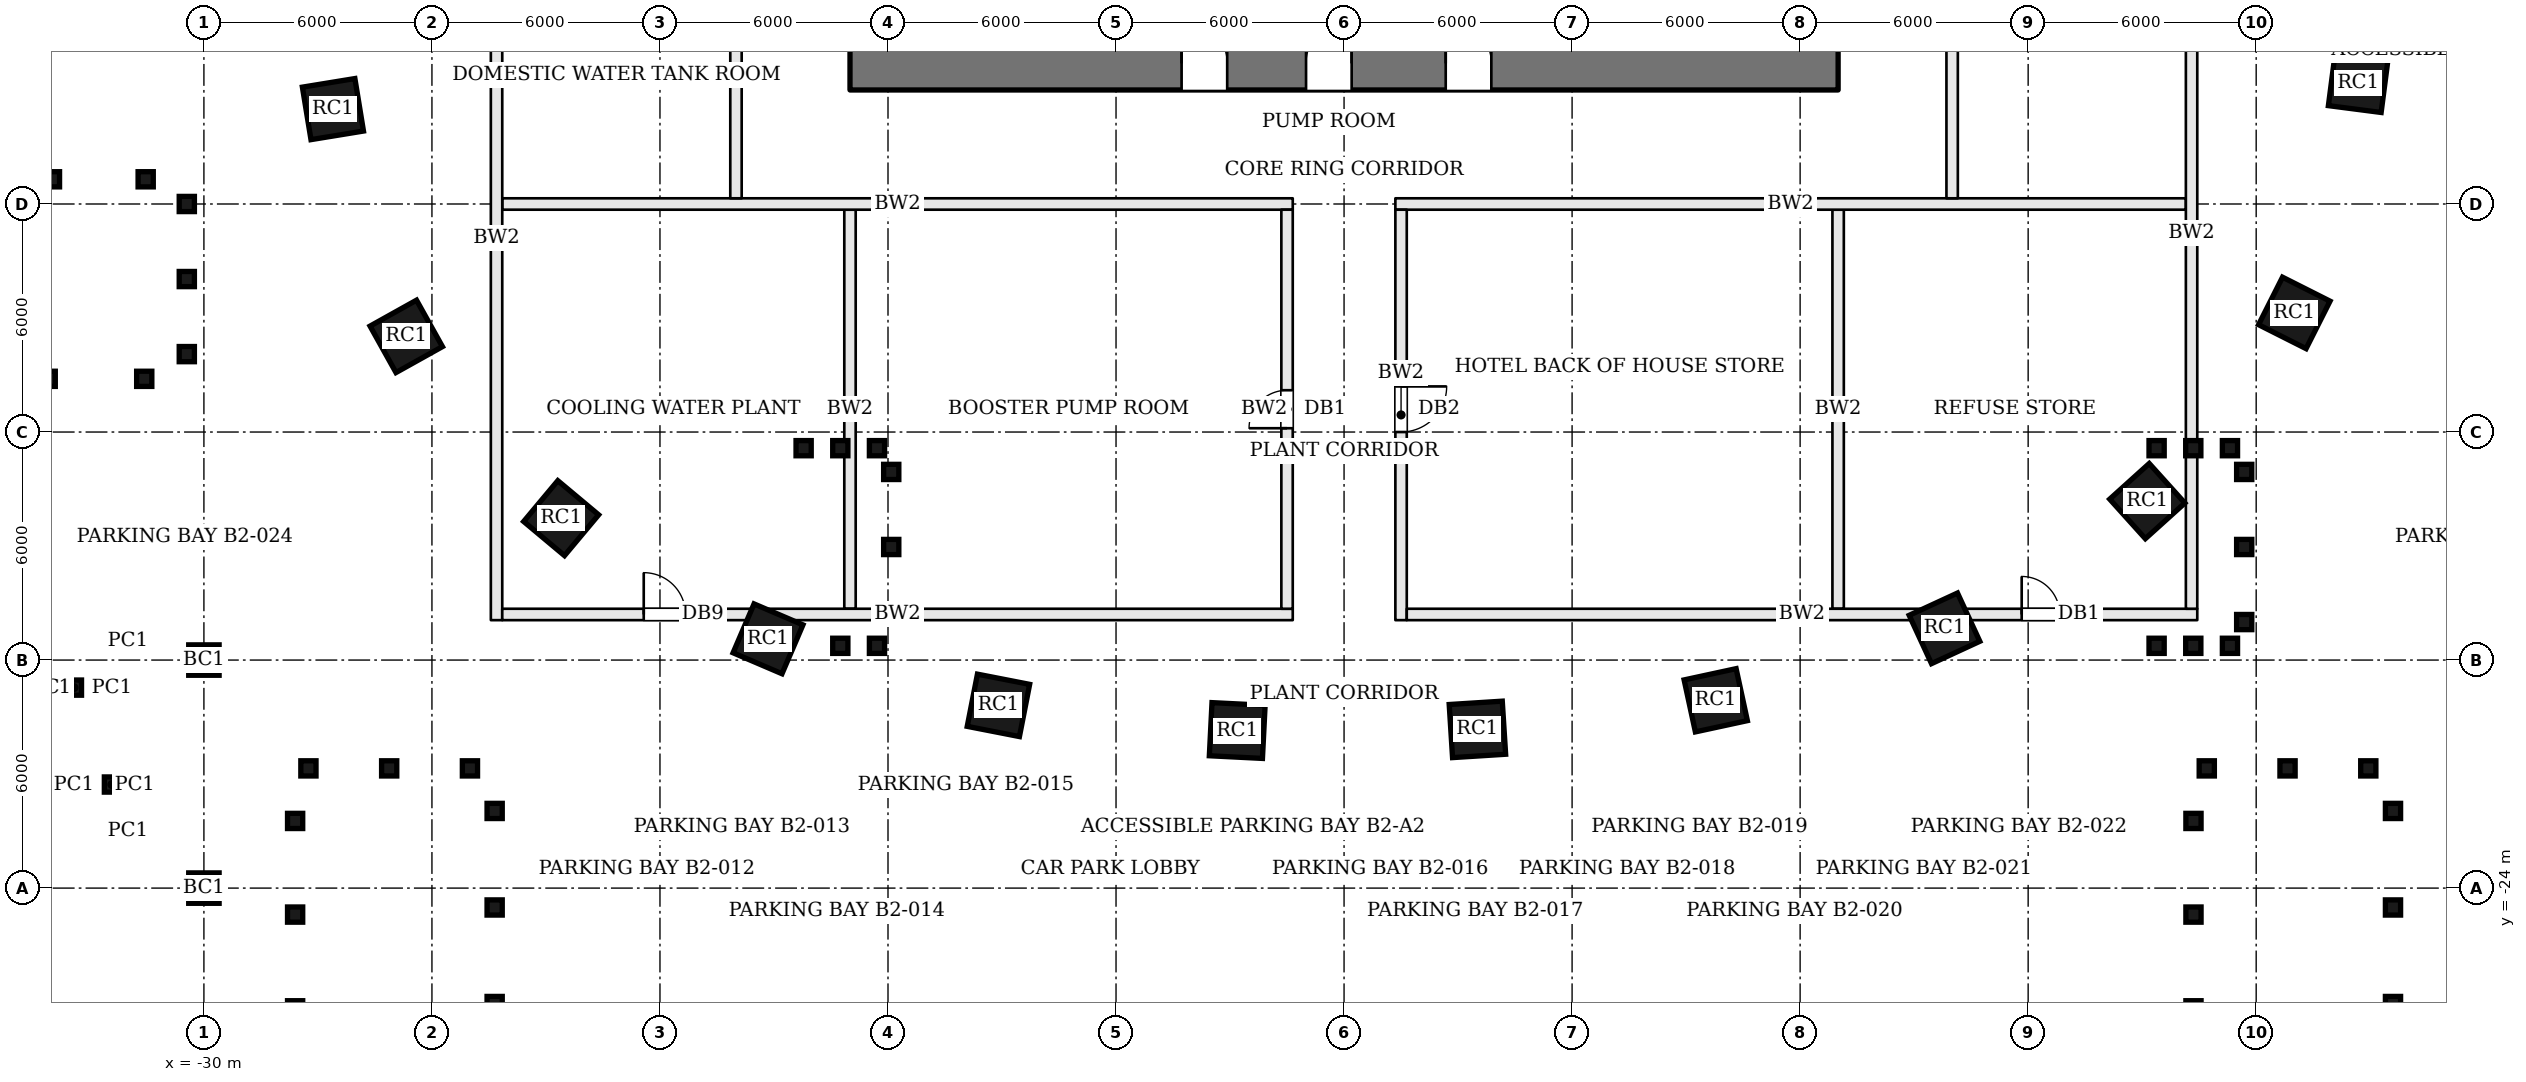
"""IFC4 building model, lengths in metres.
Left out: names, types, materials, properties, quantities, classifications, styles, units other than length and angle.
Written with IfcOpenShell. Run it as: python <this file> out.ifc"""

import sys

from ifc_helpers import new_model, si_unit, direction, frame, frame_2d, origin, origin_2d, place, context, subcontext, project, spatial, rectangle, extrude, element, fill, save


model = new_model("IFC4")
c1 = context("Model", 3, precision=1e-05, world=origin(), true_north=direction((0.0, 1.0)))
c2 = subcontext(c1, "Body", "Model", "MODEL_VIEW")
j1 = project(units=[si_unit("LENGTHUNIT", "METRE"), si_unit("PLANEANGLEUNIT", "RADIAN")], contexts=[c1])
p1 = place(None, origin())
s1 = spatial("IfcSite", under=j1, at=p1, CompositionType="ELEMENT")
p2 = place(p1, origin())
s2 = spatial("IfcBuilding", under=s1, at=p2, CompositionType="ELEMENT")
p3 = place(p2, frame((0.0, 0.0, -10.5)))
s3 = spatial("IfcBuildingStorey", under=s2, at=p3, CompositionType="ELEMENT", Elevation=-10.5)
for number, where, z_axis, x_axis in (
    (1, (-30.0, -24.0, 0.0), (0.0, 0.0, 1.0), (1.0, 0.0, 0.0)),
    (2, (-30.0, -18.0, 0.0), (0.0, 0.0, 1.0), (1.0, 0.0, 0.0)),
):
    element("IfcColumn", number, at=place(p3, frame(where, z_axis=z_axis, x_axis=x_axis)), inside=s3, PredefinedType="COLUMN", context=c2, shape_type="SweptSolid", body=[
        extrude(rectangle(XDim=0.8, YDim=0.8, at=origin_2d()), origin(), (0.0, 0.0, 1.0), 4.5),
    ])
p4 = place(p3, frame((-13.0, -2.3, 0.0), z_axis=(0.0, 0.0, 1.0), x_axis=(1.0, 0.0, 0.0)))
e3 = element("IfcWall", 3, at=p4, inside=s3, PredefinedType="SHEAR", context=c2, shape_type="SweptSolid", body=[
    extrude(rectangle(XDim=26.0, YDim=1.4, at=frame_2d((13.0, 0.0))), origin(), (0.0, 0.0, 1.0), 4.5),
])
p5 = place(p4, frame((8.725, 0.0, 0.0)))
e4 = element("IfcOpeningElement", 4, at=p5, cuts=e3, PredefinedType="OPENING", context=c2, shape_type="SweptSolid", body=[
    extrude(rectangle(XDim=1.2, YDim=2.1, at=frame_2d((0.6, 1.05))), frame((0.0, 0.71, 0.0), z_axis=(0.0, -1.0, 0.0), x_axis=(1.0, 0.0, 0.0)), (0.0, 0.0, 1.0), 1.42),
])
p6 = place(p4, frame((12.0, 0.0, 0.0)))
e5 = element("IfcOpeningElement", 5, at=p6, cuts=e3, PredefinedType="OPENING", context=c2, shape_type="SweptSolid", body=[
    extrude(rectangle(XDim=1.2, YDim=2.1, at=frame_2d((0.6, 1.05))), frame((0.0, 0.71, 0.0), z_axis=(0.0, -1.0, 0.0), x_axis=(1.0, 0.0, 0.0)), (0.0, 0.0, 1.0), 1.42),
])
p7 = place(p4, frame((15.675, 0.0, 0.0)))
e6 = element("IfcOpeningElement", 6, at=p7, cuts=e3, PredefinedType="OPENING", context=c2, shape_type="SweptSolid", body=[
    extrude(rectangle(XDim=1.2, YDim=2.1, at=frame_2d((0.6, 1.05))), frame((0.0, 0.71, 0.0), z_axis=(0.0, -1.0, 0.0), x_axis=(1.0, 0.0, 0.0)), (0.0, 0.0, 1.0), 1.42),
])
for number, where, z_axis, x_axis in (
    (7, (-26.605, -3.503, 0.0), (0.0, 0.0, 1.0), (0.161, -0.987, 0.0)),
    (8, (-24.676, -9.483, 0.0), (0.0, 0.0, 1.0), (0.487, -0.873, 0.0)),
    (9, (-20.6, -14.266, 0.0), (0.0, 0.0, 1.0), (0.767, -0.641, 0.0)),
    (10, (-15.157, -17.441, 0.0), (0.0, 0.0, 1.0), (0.919, -0.394, 0.0)),
    (11, (-9.094, -19.192, 0.0), (0.0, 0.0, 1.0), (0.981, -0.192, 0.0)),
    (12, (-2.811, -19.854, 0.0), (0.0, 0.0, 1.0), (0.999, -0.05, 0.0)),
    (13, (3.509, -19.824, 0.0), (0.0, 0.0, 1.0), (0.998, 0.063, 0.0)),
    (14, (9.78, -19.058, 0.0), (0.0, 0.0, 1.0), (0.977, 0.211, 0.0)),
    (15, (15.799, -17.165, 0.0), (0.0, 0.0, 1.0), (0.908, 0.419, 0.0)),
    (16, (21.135, -13.817, 0.0), (0.0, 0.0, 1.0), (0.743, 0.67, 0.0)),
    (17, (25.003, -8.866, 0.0), (0.0, 0.0, 1.0), (0.45, 0.893, 0.0)),
    (18, (26.684, -2.808, 0.0), (0.0, 0.0, 1.0), (0.128, 0.992, 0.0)),
):
    element("IfcColumn", number, at=place(p3, frame(where, z_axis=z_axis, x_axis=x_axis)), inside=s3, PredefinedType="COLUMN", context=c2, shape_type="SweptSolid", body=[
        extrude(rectangle(XDim=1.4, YDim=1.4, at=origin_2d()), origin(), (0.0, 0.0, 1.0), 4.5),
    ])
for number, where, z_axis, x_axis in (
    (19, (-32.0, -22.5, 0.0), (0.0, 0.0, 1.0), (1.0, 0.0, 0.0)),
    (20, (-32.0, -17.5, 0.0), (0.0, 0.0, 1.0), (1.0, 0.0, 0.0)),
    (21, (-33.42, -21.275, 0.0), (0.0, 0.0, 1.0), (1.0, 0.0, 0.0)),
    (22, (-32.42, -21.275, 0.0), (0.0, 0.0, 1.0), (1.0, 0.0, 0.0)),
    (23, (-32.42, -18.725, 0.0), (0.0, 0.0, 1.0), (1.0, 0.0, 0.0)),
    (24, (-33.42, -18.725, 0.0), (0.0, 0.0, 1.0), (1.0, 0.0, 0.0)),
):
    element("IfcColumn", number, at=place(p3, frame(where, z_axis=z_axis, x_axis=x_axis)), inside=s3, PredefinedType="COLUMN", context=c2, shape_type="SweptSolid", body=[
        extrude(rectangle(XDim=0.4, YDim=0.4, at=origin_2d()), origin(), (0.0, 0.0, 1.0), 4.5),
    ])
p8 = place(p3, frame((-13.0, -16.65, 0.0), z_axis=(0.0, 0.0, 1.0), x_axis=(0.0, 1.0, 0.0)))
e25 = element("IfcWall", 25, at=p8, inside=s3, PredefinedType="SOLIDWALL", context=c2, shape_type="SweptSolid", body=[
    extrude(rectangle(XDim=10.5, YDim=0.3, at=frame_2d((5.25, 0.0))), origin(), (0.0, 0.0, 1.0), 3.48),
])
p9 = place(p3, frame((-1.35, -6.0, 0.0), z_axis=(0.0, 0.0, 1.0), x_axis=(-1.0, 0.0, 0.0)))
e26 = element("IfcWall", 26, at=p9, inside=s3, PredefinedType="SOLIDWALL", context=c2, shape_type="SweptSolid", body=[
    extrude(rectangle(XDim=20.8, YDim=0.3, at=frame_2d((10.4, 0.0))), origin(), (0.0, 0.0, 1.0), 3.48),
])
p10 = place(p3, frame((-22.3, 3.15, 0.0), z_axis=(0.0, 0.0, 1.0), x_axis=(0.0, -1.0, 0.0)))
e27 = element("IfcWall", 27, at=p10, inside=s3, PredefinedType="SOLIDWALL", context=c2, shape_type="SweptSolid", body=[
    extrude(rectangle(XDim=20.1, YDim=0.3, at=frame_2d((10.05, 0.0))), origin(), (0.0, 0.0, 1.0), 3.48),
])
p11 = place(p3, frame((-22.15, -16.8, 0.0), z_axis=(0.0, 0.0, 1.0), x_axis=(1.0, 0.0, 0.0)))
e28 = element("IfcWall", 28, at=p11, inside=s3, PredefinedType="SOLIDWALL", context=c2, shape_type="SweptSolid", body=[
    extrude(rectangle(XDim=20.8, YDim=0.3, at=frame_2d((10.4, 0.0))), origin(), (0.0, 0.0, 1.0), 3.48),
])
p12 = place(p11, frame((3.723, 0.0, 0.0)))
e29 = element("IfcOpeningElement", 29, at=p12, cuts=e28, PredefinedType="OPENING", context=c2, shape_type="SweptSolid", body=[
    extrude(rectangle(XDim=1.1, YDim=2.4, at=frame_2d((0.55, 1.2))), frame((0.0, 0.16, 0.0), z_axis=(0.0, -1.0, 0.0), x_axis=(1.0, 0.0, 0.0)), (0.0, 0.0, 1.0), 0.32),
])
p13 = place(p3, frame((-1.5, -16.65, 0.0), z_axis=(0.0, 0.0, 1.0), x_axis=(0.0, 1.0, 0.0)))
e30 = element("IfcWall", 30, at=p13, inside=s3, PredefinedType="SOLIDWALL", context=c2, shape_type="SweptSolid", body=[
    extrude(rectangle(XDim=10.5, YDim=0.3, at=frame_2d((5.25, 0.0))), origin(), (0.0, 0.0, 1.0), 3.48),
])
p14 = place(p13, frame((4.75, 0.0, 0.0)))
e31 = element("IfcOpeningElement", 31, at=p14, cuts=e30, PredefinedType="OPENING", context=c2, shape_type="SweptSolid", body=[
    extrude(rectangle(XDim=1.0, YDim=2.1, at=frame_2d((0.5, 1.05))), frame((0.0, 0.16, 0.0), z_axis=(0.0, -1.0, 0.0), x_axis=(1.0, 0.0, 0.0)), (0.0, 0.0, 1.0), 0.32),
])
p15 = place(p3, frame((13.0, -16.65, 0.0), z_axis=(0.0, 0.0, 1.0), x_axis=(0.0, 1.0, 0.0)))
e32 = element("IfcWall", 32, at=p15, inside=s3, PredefinedType="SOLIDWALL", context=c2, shape_type="SweptSolid", body=[
    extrude(rectangle(XDim=10.5, YDim=0.3, at=frame_2d((5.25, 0.0))), origin(), (0.0, 0.0, 1.0), 3.48),
])
p16 = place(p3, frame((22.15, -6.0, 0.0), z_axis=(0.0, 0.0, 1.0), x_axis=(-1.0, 0.0, 0.0)))
e33 = element("IfcWall", 33, at=p16, inside=s3, PredefinedType="SOLIDWALL", context=c2, shape_type="SweptSolid", body=[
    extrude(rectangle(XDim=20.8, YDim=0.3, at=frame_2d((10.4, 0.0))), origin(), (0.0, 0.0, 1.0), 3.48),
])
p17 = place(p3, frame((1.5, -6.15, 0.0), z_axis=(0.0, 0.0, 1.0), x_axis=(0.0, -1.0, 0.0)))
e34 = element("IfcWall", 34, at=p17, inside=s3, PredefinedType="SOLIDWALL", context=c2, shape_type="SweptSolid", body=[
    extrude(rectangle(XDim=10.8, YDim=0.3, at=frame_2d((5.4, 0.0))), origin(), (0.0, 0.0, 1.0), 3.48),
])
p18 = place(p17, frame((4.65, 0.0, 0.0)))
e35 = element("IfcOpeningElement", 35, at=p18, cuts=e34, PredefinedType="OPENING", context=c2, shape_type="SweptSolid", body=[
    extrude(rectangle(XDim=1.2, YDim=2.1, at=frame_2d((0.6, 1.05))), frame((0.0, 0.16, 0.0), z_axis=(0.0, -1.0, 0.0), x_axis=(1.0, 0.0, 0.0)), (0.0, 0.0, 1.0), 0.32),
])
p19 = place(p3, frame((1.65, -16.8, 0.0), z_axis=(0.0, 0.0, 1.0), x_axis=(1.0, 0.0, 0.0)))
e36 = element("IfcWall", 36, at=p19, inside=s3, PredefinedType="SOLIDWALL", context=c2, shape_type="SweptSolid", body=[
    extrude(rectangle(XDim=20.8, YDim=0.3, at=frame_2d((10.4, 0.0))), origin(), (0.0, 0.0, 1.0), 3.48),
])
p20 = place(p19, frame((16.18, 0.0, 0.0)))
e37 = element("IfcOpeningElement", 37, at=p20, cuts=e36, PredefinedType="OPENING", context=c2, shape_type="SweptSolid", body=[
    extrude(rectangle(XDim=1.0, YDim=2.1, at=frame_2d((0.5, 1.05))), frame((0.0, 0.16, 0.0), z_axis=(0.0, -1.0, 0.0), x_axis=(1.0, 0.0, 0.0)), (0.0, 0.0, 1.0), 0.32),
])
p21 = place(p3, frame((22.3, -16.65, 0.0), z_axis=(0.0, 0.0, 1.0), x_axis=(0.0, 1.0, 0.0)))
e38 = element("IfcWall", 38, at=p21, inside=s3, PredefinedType="SOLIDWALL", context=c2, shape_type="SweptSolid", body=[
    extrude(rectangle(XDim=19.8, YDim=0.3, at=frame_2d((9.9, 0.0))), origin(), (0.0, 0.0, 1.0), 3.48),
])
p22 = place(p3, frame((-16.0, -5.85, 0.0), z_axis=(0.0, 0.0, 1.0), x_axis=(0.0, 1.0, 0.0)))
e39 = element("IfcWall", 39, at=p22, inside=s3, PredefinedType="SOLIDWALL", context=c2, shape_type="SweptSolid", body=[
    extrude(rectangle(XDim=9.0, YDim=0.3, at=frame_2d((4.5, 0.0))), origin(), (0.0, 0.0, 1.0), 3.48),
])
p23 = place(p3, frame((16.0, 2.85, 0.0), z_axis=(0.0, 0.0, 1.0), x_axis=(0.0, -1.0, 0.0)))
e40 = element("IfcWall", 40, at=p23, inside=s3, PredefinedType="SOLIDWALL", context=c2, shape_type="SweptSolid", body=[
    extrude(rectangle(XDim=8.7, YDim=0.3, at=frame_2d((4.35, 0.0))), origin(), (0.0, 0.0, 1.0), 3.48),
])
for number, where, z_axis, x_axis in (
    (41, (-11.915, -13.05, 0.0), (0.0, 0.0, 1.0), (1.0, 0.0, 0.0)),
    (42, (-11.915, -15.025, 0.0), (0.0, 0.0, 1.0), (1.0, 0.0, 0.0)),
    (43, (-12.29, -17.625, 0.0), (0.0, 0.0, 1.0), (1.0, 0.0, 0.0)),
    (44, (-13.255, -17.625, 0.0), (0.0, 0.0, 1.0), (1.0, 0.0, 0.0)),
    (45, (-14.22, -12.425, 0.0), (0.0, 0.0, 1.0), (1.0, 0.0, 0.0)),
    (46, (-12.29, -12.425, 0.0), (0.0, 0.0, 1.0), (1.0, 0.0, 0.0)),
    (47, (-13.255, -12.425, 0.0), (0.0, 0.0, 1.0), (1.0, 0.0, 0.0)),
    (48, (23.685, -17.0, 0.0), (0.0, 0.0, 1.0), (1.0, 0.0, 0.0)),
    (49, (23.685, -13.05, 0.0), (0.0, 0.0, 1.0), (1.0, 0.0, 0.0)),
    (50, (23.685, -15.025, 0.0), (0.0, 0.0, 1.0), (1.0, 0.0, 0.0)),
    (51, (21.38, -17.625, 0.0), (0.0, 0.0, 1.0), (1.0, 0.0, 0.0)),
    (52, (23.31, -17.625, 0.0), (0.0, 0.0, 1.0), (1.0, 0.0, 0.0)),
    (53, (22.345, -17.625, 0.0), (0.0, 0.0, 1.0), (1.0, 0.0, 0.0)),
    (54, (21.38, -12.425, 0.0), (0.0, 0.0, 1.0), (1.0, 0.0, 0.0)),
    (55, (23.31, -12.425, 0.0), (0.0, 0.0, 1.0), (1.0, 0.0, 0.0)),
    (56, (22.345, -12.425, 0.0), (0.0, 0.0, 1.0), (1.0, 0.0, 0.0)),
    (57, (27.6, -27.05, 0.0), (0.0, 0.0, 1.0), (1.0, 0.0, 0.0)),
    (58, (27.6, -24.51, 0.0), (0.0, 0.0, 1.0), (1.0, 0.0, 0.0)),
    (59, (27.6, -21.97, 0.0), (0.0, 0.0, 1.0), (1.0, 0.0, 0.0)),
    (60, (26.95, -20.85, 0.0), (0.0, 0.0, 1.0), (1.0, 0.0, 0.0)),
    (61, (22.7, -20.85, 0.0), (0.0, 0.0, 1.0), (1.0, 0.0, 0.0)),
    (62, (24.825, -20.85, 0.0), (0.0, 0.0, 1.0), (1.0, 0.0, 0.0)),
    (63, (22.35, -22.233, 0.0), (0.0, 0.0, 1.0), (1.0, 0.0, 0.0)),
    (64, (22.35, -24.697, 0.0), (0.0, 0.0, 1.0), (1.0, 0.0, 0.0)),
    (65, (22.35, -27.163, 0.0), (0.0, 0.0, 1.0), (1.0, 0.0, 0.0)),
    (66, (-22.35, -27.05, 0.0), (0.0, 0.0, 1.0), (1.0, 0.0, 0.0)),
    (67, (-22.35, -24.51, 0.0), (0.0, 0.0, 1.0), (1.0, 0.0, 0.0)),
    (68, (-22.35, -21.97, 0.0), (0.0, 0.0, 1.0), (1.0, 0.0, 0.0)),
    (69, (-23.0, -20.85, 0.0), (0.0, 0.0, 1.0), (1.0, 0.0, 0.0)),
    (70, (-27.25, -20.85, 0.0), (0.0, 0.0, 1.0), (1.0, 0.0, 0.0)),
    (71, (-25.125, -20.85, 0.0), (0.0, 0.0, 1.0), (1.0, 0.0, 0.0)),
    (72, (-27.6, -22.233, 0.0), (0.0, 0.0, 1.0), (1.0, 0.0, 0.0)),
    (73, (-27.6, -24.697, 0.0), (0.0, 0.0, 1.0), (1.0, 0.0, 0.0)),
    (74, (-27.6, -27.163, 0.0), (0.0, 0.0, 1.0), (1.0, 0.0, 0.0)),
    (75, (-31.57, -10.6, 0.0), (0.0, 0.0, 1.0), (1.0, 0.0, 0.0)),
    (76, (-34.11, -10.6, 0.0), (0.0, 0.0, 1.0), (1.0, 0.0, 0.0)),
    (77, (-33.998, -5.35, 0.0), (0.0, 0.0, 1.0), (1.0, 0.0, 0.0)),
    (78, (-31.532, -5.35, 0.0), (0.0, 0.0, 1.0), (1.0, 0.0, 0.0)),
    (79, (-30.45, -6.0, 0.0), (0.0, 0.0, 1.0), (1.0, 0.0, 0.0)),
    (80, (-30.45, -9.95, 0.0), (0.0, 0.0, 1.0), (1.0, 0.0, 0.0)),
    (81, (-30.45, -7.975, 0.0), (0.0, 0.0, 1.0), (1.0, 0.0, 0.0)),
):
    element("IfcColumn", number, at=place(p3, frame(where, z_axis=z_axis, x_axis=x_axis)), inside=s3, PredefinedType="COLUMN", context=c2, shape_type="SweptSolid", body=[
        extrude(rectangle(XDim=0.4, YDim=0.4, at=origin_2d()), origin(), (0.0, 0.0, 1.0), 4.5),
    ])
p24 = place(p5, origin())
e82 = element("IfcDoor", 82, at=p24, inside=s3, OperationType="SINGLE_SWING_LEFT", PredefinedType="DOOR", context=c2, shape_type="SweptSolid", body=[
    extrude(rectangle(XDim=1.2, YDim=2.1, at=frame_2d((0.6, 1.05))), frame((0.0, 0.025, 0.0), z_axis=(0.0, -1.0, 0.0), x_axis=(1.0, 0.0, 0.0)), (0.0, 0.0, 1.0), 0.05),
])
fill(e4, e82)
p25 = place(p6, origin())
e83 = element("IfcDoor", 83, at=p25, inside=s3, OperationType="SINGLE_SWING_RIGHT", PredefinedType="DOOR", context=c2, shape_type="SweptSolid", body=[
    extrude(rectangle(XDim=1.2, YDim=2.1, at=frame_2d((0.6, 1.05))), frame((0.0, 0.025, 0.0), z_axis=(0.0, -1.0, 0.0), x_axis=(1.0, 0.0, 0.0)), (0.0, 0.0, 1.0), 0.05),
])
fill(e5, e83)
p26 = place(p7, origin())
e84 = element("IfcDoor", 84, at=p26, inside=s3, OperationType="SINGLE_SWING_LEFT", PredefinedType="DOOR", context=c2, shape_type="SweptSolid", body=[
    extrude(rectangle(XDim=1.2, YDim=2.1, at=frame_2d((0.6, 1.05))), frame((0.0, 0.025, 0.0), z_axis=(0.0, -1.0, 0.0), x_axis=(1.0, 0.0, 0.0)), (0.0, 0.0, 1.0), 0.05),
])
fill(e6, e84)
p27 = place(p12, origin())
e85 = element("IfcDoor", 85, at=p27, inside=s3, OperationType="SINGLE_SWING_LEFT", PredefinedType="DOOR", context=c2, shape_type="SweptSolid", body=[
    extrude(rectangle(XDim=1.1, YDim=2.4, at=frame_2d((0.55, 1.2))), frame((0.0, 0.025, 0.0), z_axis=(0.0, -1.0, 0.0), x_axis=(1.0, 0.0, 0.0)), (0.0, 0.0, 1.0), 0.05),
])
fill(e29, e85)
p28 = place(p14, origin())
e86 = element("IfcDoor", 86, at=p28, inside=s3, OperationType="SINGLE_SWING_LEFT", PredefinedType="DOOR", context=c2, shape_type="SweptSolid", body=[
    extrude(rectangle(XDim=1.0, YDim=2.1, at=frame_2d((0.5, 1.05))), frame((0.0, 0.025, 0.0), z_axis=(0.0, -1.0, 0.0), x_axis=(1.0, 0.0, 0.0)), (0.0, 0.0, 1.0), 0.05),
])
fill(e31, e86)
p29 = place(p18, origin())
e87 = element("IfcDoor", 87, at=p29, inside=s3, OperationType="SINGLE_SWING_LEFT", PredefinedType="DOOR", context=c2, shape_type="SweptSolid", body=[
    extrude(rectangle(XDim=1.2, YDim=2.1, at=frame_2d((0.6, 1.05))), frame((0.0, 0.025, 0.0), z_axis=(0.0, -1.0, 0.0), x_axis=(1.0, 0.0, 0.0)), (0.0, 0.0, 1.0), 0.05),
])
fill(e35, e87)
p30 = place(p20, origin())
e88 = element("IfcDoor", 88, at=p30, inside=s3, OperationType="SINGLE_SWING_LEFT", PredefinedType="DOOR", context=c2, shape_type="SweptSolid", body=[
    extrude(rectangle(XDim=1.0, YDim=2.1, at=frame_2d((0.5, 1.05))), frame((0.0, 0.025, 0.0), z_axis=(0.0, -1.0, 0.0), x_axis=(1.0, 0.0, 0.0)), (0.0, 0.0, 1.0), 0.05),
])
fill(e37, e88)
save(model, sys.argv[1])
